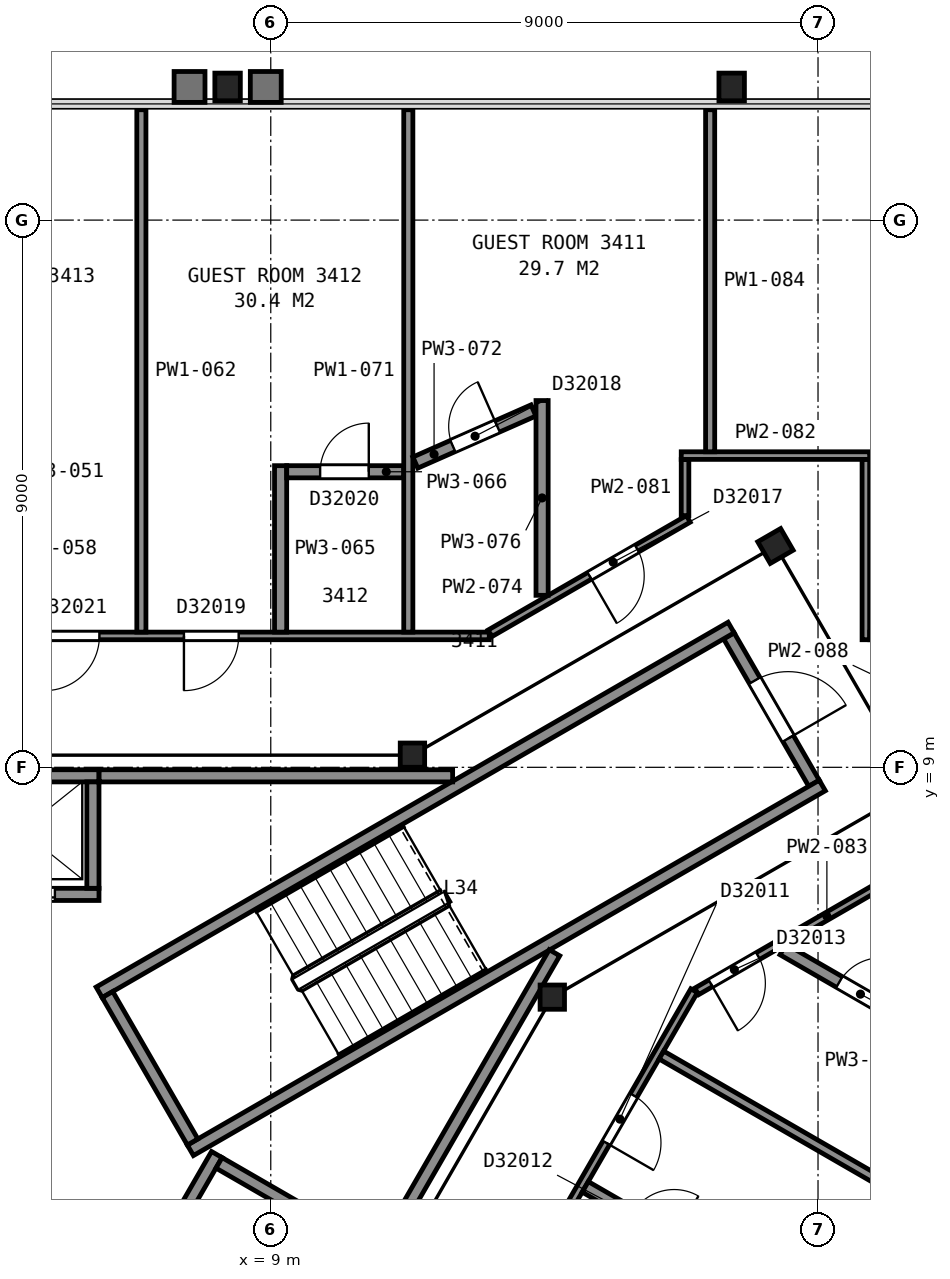
"""IFC4 building model, lengths in metres.
Left out: names, types, materials, properties, quantities, classifications, styles, units other than length and angle.
Written with IfcOpenShell. Run it as: python <this file> out.ifc"""

import sys

from ifc_helpers import new_model, si_unit, direction, frame, frame_2d, origin, origin_2d, place, context, subcontext, project, spatial, rectangle, i_section, extrude, element, fill, save


model = new_model("IFC4")
c1 = context("Model", 3, precision=1e-05, world=origin(), true_north=direction((0.0, 1.0)))
c2 = subcontext(c1, "Body", "Model", "MODEL_VIEW")
j1 = project(units=[si_unit("LENGTHUNIT", "METRE"), si_unit("PLANEANGLEUNIT", "RADIAN")], contexts=[c1])
p1 = place(None, origin())
s1 = spatial("IfcSite", under=j1, at=p1, CompositionType="ELEMENT")
p2 = place(p1, origin())
s2 = spatial("IfcBuilding", under=s1, at=p2, CompositionType="ELEMENT")
p3 = place(p2, frame((0.0, 0.0, 139.6)))
s3 = spatial("IfcBuildingStorey", under=s2, at=p3, CompositionType="ELEMENT", Elevation=139.6)
for number, where, z_axis, x_axis in (
    (1, (16.58, 20.19, 0.0), (0.0, 0.0, 1.0), (1.0, 0.0, 0.0)),
    (2, (8.29, 20.19, 0.0), (0.0, 0.0, 1.0), (1.0, 0.0, 0.0)),
):
    element("IfcColumn", number, at=place(p3, frame(where, z_axis=z_axis, x_axis=x_axis)), inside=s3, PredefinedType="COLUMN", context=c2, shape_type="SweptSolid", body=[
        extrude(i_section(OverallWidth=0.419, OverallDepth=0.455, WebThickness=0.042, FlangeThickness=0.068, FilletRadius=0.015, at=origin_2d()), origin(), (0.0, 0.0, 1.0), 2.87),
    ])
p4 = place(p3, frame((13.63, 5.22, 0.0), z_axis=(0.0, 0.0, 1.0), x_axis=(1.0, 0.0, 0.0)))
e3 = element("IfcColumn", 3, at=p4, inside=s3, PredefinedType="COLUMN", context=c2, shape_type="SweptSolid", body=[
    extrude(i_section(OverallWidth=0.401, OverallDepth=0.399, WebThickness=0.025, FlangeThickness=0.04, FilletRadius=0.015, at=origin_2d()), origin(), (0.0, 0.0, 1.0), 3.535),
])
p5 = place(p3, frame((17.3, 12.64, 0.0), z_axis=(0.0, 0.0, 1.0), x_axis=(0.5, -0.866025403784, 0.0)))
e4 = element("IfcColumn", 4, at=p5, inside=s3, PredefinedType="COLUMN", context=c2, shape_type="SweptSolid", body=[
    extrude(i_section(OverallWidth=0.411, OverallDepth=0.434, WebThickness=0.036, FlangeThickness=0.057, FilletRadius=0.015, at=origin_2d()), origin(), (0.0, 0.0, 1.0), 3.545),
])
p6 = place(p3, frame((11.33, 9.2, 0.0), z_axis=(0.0, 0.0, 1.0), x_axis=(1.0, 0.0, 0.0)))
e5 = element("IfcColumn", 5, at=p6, inside=s3, PredefinedType="COLUMN", context=c2, shape_type="SweptSolid", body=[
    extrude(i_section(OverallWidth=0.401, OverallDepth=0.399, WebThickness=0.025, FlangeThickness=0.04, FilletRadius=0.015, at=origin_2d()), origin(), (0.0, 0.0, 1.0), 3.535),
])
p7 = place(p3, frame((17.934, 8.738, 0.0), z_axis=(0.0, 0.0, 1.0), x_axis=(-0.49998411664, 0.866034573852, 0.0)))
e6 = element("IfcWall", 6, at=p7, inside=s3, PredefinedType="PARTITIONING", context=c2, shape_type="SweptSolid", body=[
    extrude(rectangle(XDim=2.8, YDim=0.2, at=frame_2d((1.4, 0.0))), origin(), (0.0, 0.0, 1.0), 3.35),
])
p8 = place(p7, frame((0.85, 0.0, 0.0)))
e7 = element("IfcOpeningElement", 7, at=p8, cuts=e6, PredefinedType="OPENING", context=c2, shape_type="SweptSolid", body=[
    extrude(rectangle(XDim=1.1, YDim=2.1, at=frame_2d((0.55, 1.05))), frame((0.0, 0.11, 0.0), z_axis=(0.0, -1.0, 0.0), x_axis=(1.0, 0.0, 0.0)), (0.0, 0.0, 1.0), 0.22),
])
for number, where, z_axis, x_axis in (
    (8, (6.178, 5.299, 0.0), (0.0, 0.0, 1.0), (0.866, 0.5, 0.0)),
    (9, (7.678, 2.701, 0.0), (0.0, 0.0, 1.0), (0.866, 0.5, 0.0)),
):
    element("IfcWall", number, at=place(p3, frame(where, z_axis=z_axis, x_axis=x_axis)), inside=s3, PredefinedType="PARTITIONING", context=c2, shape_type="SweptSolid", body=[
        extrude(rectangle(XDim=12.0, YDim=0.2, at=frame_2d((6.0, 0.0))), origin(), (0.0, 0.0, 1.0), 3.35),
    ])
p9 = place(p3, frame((7.715, 2.838, 0.0), z_axis=(0.0, 0.0, 1.0), x_axis=(-0.500049511043, 0.865996816683, 0.0)))
e10 = element("IfcWall", 10, at=p9, inside=s3, PredefinedType="PARTITIONING", context=c2, shape_type="SweptSolid", body=[
    extrude(rectangle(XDim=2.8, YDim=0.2, at=frame_2d((1.4, 0.0))), origin(), (0.0, 0.0, 1.0), 3.35),
])
p10 = place(p3, frame((3.625, 6.91, 0.0), z_axis=(0.0, 0.0, 1.0), x_axis=(1.0, 0.0, 0.0)))
e11 = element("IfcWall", 11, at=p10, inside=s3, PredefinedType="PARTITIONING", context=c2, shape_type="SweptSolid", body=[
    extrude(rectangle(XDim=2.55, YDim=0.2, at=frame_2d((1.275, 0.0))), origin(), (0.0, 0.0, 1.0), 3.6),
])
p11 = place(p10, frame((0.725, 0.0, 0.0)))
e12 = element("IfcOpeningElement", 12, at=p11, cuts=e11, PredefinedType="OPENING", context=c2, shape_type="SweptSolid", body=[
    extrude(rectangle(XDim=1.1, YDim=2.1, at=frame_2d((0.55, 1.05))), frame((0.0, 0.11, 0.0), z_axis=(0.0, -1.0, 0.0), x_axis=(1.0, 0.0, 0.0)), (0.0, 0.0, 1.0), 0.22),
])
p12 = place(p3, frame((3.625, 8.86, 0.0), z_axis=(0.0, 0.0, 1.0), x_axis=(1.0, 0.0, 0.0)))
e13 = element("IfcWall", 13, at=p12, inside=s3, PredefinedType="PARTITIONING", context=c2, shape_type="SweptSolid", body=[
    extrude(rectangle(XDim=2.55, YDim=0.2, at=frame_2d((1.275, 0.0))), origin(), (0.0, 0.0, 1.0), 3.6),
])
p13 = place(p3, frame((5.663, -1.612, 0.0), z_axis=(0.0, 0.0, 1.0), x_axis=(0.49998122708, 0.866036242063, 0.0)))
e14 = element("IfcWall", 14, at=p13, inside=s3, PredefinedType="PARTITIONING", context=c2, shape_type="SweptSolid", body=[
    extrude(rectangle(XDim=4.9, YDim=0.2, at=frame_2d((2.45, 0.0))), origin(), (0.0, 0.0, 1.0), 3.6),
])
p14 = place(p3, frame((6.075, 7.01, 0.0), z_axis=(0.0, 0.0, 1.0), x_axis=(0.0, 1.0, 0.0)))
e15 = element("IfcWall", 15, at=p14, inside=s3, PredefinedType="PARTITIONING", context=c2, shape_type="SweptSolid", body=[
    extrude(rectangle(XDim=1.75, YDim=0.2, at=frame_2d((0.875, 0.0))), origin(), (0.0, 0.0, 1.0), 3.6),
])
p15 = place(p3, frame((9.665, 1.62, 0.0), z_axis=(0.0, 0.0, 1.0), x_axis=(-0.866002029911, 0.500040482552, 0.0)))
e16 = element("IfcWall", 16, at=p15, inside=s3, PredefinedType="PARTITIONING", context=c2, shape_type="SweptSolid", body=[
    extrude(rectangle(XDim=1.75, YDim=0.2, at=frame_2d((0.875, 0.0))), origin(), (0.0, 0.0, 1.0), 3.6),
])
p16 = place(p3, frame((6.177, 8.86, 0.0), z_axis=(0.0, 0.0, 1.0), x_axis=(1.0, 0.0, 0.0)))
e17 = element("IfcWall", 17, at=p16, inside=s3, PredefinedType="PARTITIONING", context=c2, shape_type="SweptSolid", body=[
    extrude(rectangle(XDim=5.814, YDim=0.2, at=frame_2d((2.907, 0.0))), origin(), (0.0, 0.0, 1.0), 3.35),
])
p17 = place(p3, frame((8.492, -3.012, 0.0), z_axis=(0.0, 0.0, 1.0), x_axis=(0.499972957231, 0.866041016371, 0.0)))
e18 = element("IfcWall", 18, at=p17, inside=s3, PredefinedType="PARTITIONING", context=c2, shape_type="SweptSolid", body=[
    extrude(rectangle(XDim=10.349, YDim=0.2, at=frame_2d((5.174, 0.0))), origin(), (0.0, 0.0, 1.0), 3.35),
])
p18 = place(p3, frame((-12.594, 11.161, 0.0), z_axis=(0.0, 0.0, 1.0), x_axis=(1.0, 0.0, 0.0)))
e19 = element("IfcWall", 19, at=p18, inside=s3, PredefinedType="PARTITIONING", context=c2, shape_type="SweptSolid", body=[
    extrude(rectangle(XDim=25.187, YDim=0.125, at=frame_2d((12.594, 0.0))), origin(), (0.0, 0.0, 1.0), 2.262),
])
p19 = place(p18, frame((20.166, 0.0, 0.0)))
e20 = element("IfcOpeningElement", 20, at=p19, cuts=e19, PredefinedType="OPENING", context=c2, shape_type="SweptSolid", body=[
    extrude(rectangle(XDim=0.9, YDim=2.1, at=frame_2d((0.45, 1.05))), frame((0.0, 0.073, 0.0), z_axis=(0.0, -1.0, 0.0), x_axis=(1.0, 0.0, 0.0)), (0.0, 0.0, 1.0), 0.145),
])
p20 = place(p18, frame((17.875, 0.0, 0.0)))
e21 = element("IfcOpeningElement", 21, at=p20, cuts=e19, PredefinedType="OPENING", context=c2, shape_type="SweptSolid", body=[
    extrude(rectangle(XDim=0.9, YDim=2.1, at=frame_2d((0.45, 1.05))), frame((0.0, 0.073, 0.0), z_axis=(0.0, -1.0, 0.0), x_axis=(1.0, 0.0, 0.0)), (0.0, 0.0, 1.0), 0.145),
])
p21 = place(p18, frame((11.062, 0.0, 0.0)))
e22 = element("IfcOpeningElement", 22, at=p21, cuts=e19, PredefinedType="OPENING", context=c2, shape_type="SweptSolid", body=[
    extrude(rectangle(XDim=0.9, YDim=2.1, at=frame_2d((0.45, 1.05))), frame((0.0, 0.073, 0.0), z_axis=(0.0, -1.0, 0.0), x_axis=(1.0, 0.0, 0.0)), (0.0, 0.0, 1.0), 0.145),
])
p22 = place(p18, frame((8.521, 0.0, 0.0)))
e23 = element("IfcOpeningElement", 23, at=p22, cuts=e19, PredefinedType="OPENING", context=c2, shape_type="SweptSolid", body=[
    extrude(rectangle(XDim=0.9, YDim=2.1, at=frame_2d((0.45, 1.05))), frame((0.0, 0.073, 0.0), z_axis=(0.0, -1.0, 0.0), x_axis=(1.0, 0.0, 0.0)), (0.0, 0.0, 1.0), 0.145),
])
p23 = place(p18, frame((2.031, 0.0, 0.0)))
e24 = element("IfcOpeningElement", 24, at=p23, cuts=e19, PredefinedType="OPENING", context=c2, shape_type="SweptSolid", body=[
    extrude(rectangle(XDim=0.9, YDim=2.1, at=frame_2d((0.45, 1.05))), frame((0.0, 0.073, 0.0), z_axis=(0.0, -1.0, 0.0), x_axis=(1.0, 0.0, 0.0)), (0.0, 0.0, 1.0), 0.145),
])
p24 = place(p3, frame((15.962, 5.326, 0.0), z_axis=(0.0, 0.0, 1.0), x_axis=(-0.499992829944, -0.866029543379, 0.0)))
e25 = element("IfcWall", 25, at=p24, inside=s3, PredefinedType="PARTITIONING", context=c2, shape_type="SweptSolid", body=[
    extrude(rectangle(XDim=24.413, YDim=0.125, at=frame_2d((12.207, 0.0))), origin(), (0.0, 0.0, 1.0), 2.262),
])
p25 = place(p24, frame((21.258, 0.0, 0.0)))
e26 = element("IfcOpeningElement", 26, at=p25, cuts=e25, PredefinedType="OPENING", context=c2, shape_type="SweptSolid", body=[
    extrude(rectangle(XDim=0.9, YDim=2.1, at=frame_2d((0.45, 1.05))), frame((0.0, 0.073, 0.0), z_axis=(0.0, -1.0, 0.0), x_axis=(1.0, 0.0, 0.0)), (0.0, 0.0, 1.0), 0.145),
])
p26 = place(p24, frame((18.502, 0.0, 0.0)))
e27 = element("IfcOpeningElement", 27, at=p26, cuts=e25, PredefinedType="OPENING", context=c2, shape_type="SweptSolid", body=[
    extrude(rectangle(XDim=0.9, YDim=2.1, at=frame_2d((0.45, 1.05))), frame((0.0, 0.073, 0.0), z_axis=(0.0, -1.0, 0.0), x_axis=(1.0, 0.0, 0.0)), (0.0, 0.0, 1.0), 0.145),
])
p27 = place(p24, frame((11.799, 0.0, 0.0)))
e28 = element("IfcOpeningElement", 28, at=p27, cuts=e25, PredefinedType="OPENING", context=c2, shape_type="SweptSolid", body=[
    extrude(rectangle(XDim=0.9, YDim=2.1, at=frame_2d((0.45, 1.05))), frame((0.0, 0.073, 0.0), z_axis=(0.0, -1.0, 0.0), x_axis=(1.0, 0.0, 0.0)), (0.0, 0.0, 1.0), 0.145),
])
p28 = place(p24, frame((9.043, 0.0, 0.0)))
e29 = element("IfcOpeningElement", 29, at=p28, cuts=e25, PredefinedType="OPENING", context=c2, shape_type="SweptSolid", body=[
    extrude(rectangle(XDim=0.9, YDim=2.1, at=frame_2d((0.45, 1.05))), frame((0.0, 0.073, 0.0), z_axis=(0.0, -1.0, 0.0), x_axis=(1.0, 0.0, 0.0)), (0.0, 0.0, 1.0), 0.145),
])
p29 = place(p24, frame((1.99, 0.0, 0.0)))
e30 = element("IfcOpeningElement", 30, at=p29, cuts=e25, PredefinedType="OPENING", context=c2, shape_type="SweptSolid", body=[
    extrude(rectangle(XDim=0.9, YDim=2.1, at=frame_2d((0.45, 1.05))), frame((0.0, 0.073, 0.0), z_axis=(0.0, -1.0, 0.0), x_axis=(1.0, 0.0, 0.0)), (0.0, 0.0, 1.0), 0.145),
])
p30 = place(p3, frame((6.872, 11.223, 0.0), z_axis=(0.0, 0.0, 1.0), x_axis=(0.0, 1.0, 0.0)))
e31 = element("IfcWall", 31, at=p30, inside=s3, PredefinedType="PARTITIONING", context=c2, shape_type="SweptSolid", body=[
    extrude(rectangle(XDim=8.592, YDim=0.15, at=frame_2d((4.296, 0.0))), origin(), (0.0, 0.0, 1.0), 2.262),
])
p31 = place(p3, frame((9.162, 11.223, 0.0), z_axis=(0.0, 0.0, 1.0), x_axis=(0.0, 1.0, 0.0)))
e32 = element("IfcWall", 32, at=p31, inside=s3, PredefinedType="PARTITIONING", context=c2, shape_type="SweptSolid", body=[
    extrude(rectangle(XDim=2.738, YDim=0.2, at=frame_2d((1.369, 0.0))), origin(), (0.0, 0.0, 1.0), 2.262),
])
p32 = place(p3, frame((11.187, 13.861, 0.0), z_axis=(0.0, 0.0, 1.0), x_axis=(-1.0, 0.0, 0.0)))
e33 = element("IfcWall", 33, at=p32, inside=s3, PredefinedType="PARTITIONING", context=c2, shape_type="SweptSolid", body=[
    extrude(rectangle(XDim=1.925, YDim=0.2, at=frame_2d((0.962, 0.0))), origin(), (0.0, 0.0, 1.0), 2.262),
])
p33 = place(p32, frame((0.575, 0.0, 0.0)))
e34 = element("IfcOpeningElement", 34, at=p33, cuts=e33, PredefinedType="OPENING", context=c2, shape_type="SweptSolid", body=[
    extrude(rectangle(XDim=0.8, YDim=2.1, at=frame_2d((0.4, 1.05))), frame((0.0, 0.11, 0.0), z_axis=(0.0, -1.0, 0.0), x_axis=(1.0, 0.0, 0.0)), (0.0, 0.0, 1.0), 0.22),
])
p34 = place(p3, frame((11.262, 11.223, 0.0), z_axis=(0.0, 0.0, 1.0), x_axis=(0.0, 1.0, 0.0)))
e35 = element("IfcWall", 35, at=p34, inside=s3, PredefinedType="PARTITIONING", context=c2, shape_type="SweptSolid", body=[
    extrude(rectangle(XDim=8.592, YDim=0.15, at=frame_2d((4.296, 0.0))), origin(), (0.0, 0.0, 1.0), 2.262),
])
p35 = place(p3, frame((13.32, 14.869, 0.0), z_axis=(0.0, 0.0, 1.0), x_axis=(-0.914870345188, -0.403747757263, 0.0)))
e36 = element("IfcWall", 36, at=p35, inside=s3, PredefinedType="PARTITIONING", context=c2, shape_type="SweptSolid", body=[
    extrude(rectangle(XDim=2.124, YDim=0.2, at=frame_2d((1.062, 0.0))), origin(), (0.0, 0.0, 1.0), 2.262),
])
p36 = place(p35, frame((0.65, 0.0, 0.0)))
e37 = element("IfcOpeningElement", 37, at=p36, cuts=e36, PredefinedType="OPENING", context=c2, shape_type="SweptSolid", body=[
    extrude(rectangle(XDim=0.8, YDim=2.1, at=frame_2d((0.4, 1.05))), frame((0.0, 0.11, 0.0), z_axis=(0.0, -1.0, 0.0), x_axis=(1.0, 0.0, 0.0)), (0.0, 0.0, 1.0), 0.22),
])
p37 = place(p3, frame((12.605, 11.203, 0.0), z_axis=(0.0, 0.0, 1.0), x_axis=(0.866113281362, 0.499847760672, 0.0)))
e38 = element("IfcWall", 38, at=p37, inside=s3, PredefinedType="PARTITIONING", context=c2, shape_type="SweptSolid", body=[
    extrude(rectangle(XDim=3.767, YDim=0.125, at=frame_2d((1.883, 0.0))), origin(), (0.0, 0.0, 1.0), 2.262),
])
p38 = place(p37, frame((1.89, 0.0, 0.0)))
e39 = element("IfcOpeningElement", 39, at=p38, cuts=e38, PredefinedType="OPENING", context=c2, shape_type="SweptSolid", body=[
    extrude(rectangle(XDim=0.9, YDim=2.1, at=frame_2d((0.45, 1.05))), frame((0.0, 0.073, 0.0), z_axis=(0.0, -1.0, 0.0), x_axis=(1.0, 0.0, 0.0)), (0.0, 0.0, 1.0), 0.145),
])
p39 = place(p3, frame((13.462, 11.829, 0.0), z_axis=(0.0, 0.0, 1.0), x_axis=(0.0, 1.0, 0.0)))
e40 = element("IfcWall", 40, at=p39, inside=s3, PredefinedType="PARTITIONING", context=c2, shape_type="SweptSolid", body=[
    extrude(rectangle(XDim=3.203, YDim=0.2, at=frame_2d((1.602, 0.0))), origin(), (0.0, 0.0, 1.0), 2.262),
])
p40 = place(p3, frame((16.542, 0.731, 0.0), z_axis=(0.0, 0.0, 1.0), x_axis=(-0.86596722502, 0.50010075504, 0.0)))
e41 = element("IfcWall", 41, at=p40, inside=s3, PredefinedType="PARTITIONING", context=c2, shape_type="SweptSolid", body=[
    extrude(rectangle(XDim=2.737, YDim=0.2, at=frame_2d((1.369, 0.0))), origin(), (0.0, 0.0, 1.0), 2.262),
])
p41 = place(p40, frame((1.05, 0.0, 0.0)))
e42 = element("IfcOpeningElement", 42, at=p41, cuts=e41, PredefinedType="OPENING", context=c2, shape_type="SweptSolid", body=[
    extrude(rectangle(XDim=0.8, YDim=2.1, at=frame_2d((0.4, 1.05))), frame((0.0, 0.11, 0.0), z_axis=(0.0, -1.0, 0.0), x_axis=(1.0, 0.0, 0.0)), (0.0, 0.0, 1.0), 0.22),
])
p42 = place(p3, frame((15.424, 4.268, 0.0), z_axis=(0.0, 0.0, 1.0), x_axis=(0.866022320763, -0.500005339912, 0.0)))
e43 = element("IfcWall", 43, at=p42, inside=s3, PredefinedType="PARTITIONING", context=c2, shape_type="SweptSolid", body=[
    extrude(rectangle(XDim=8.591, YDim=0.15, at=frame_2d((4.296, 0.0))), origin(), (0.0, 0.0, 1.0), 2.262),
])
p43 = place(p3, frame((15.813, 13.14, 0.0), z_axis=(0.0, 0.0, 1.0), x_axis=(0.0, 1.0, 0.0)))
e44 = element("IfcWall", 44, at=p43, inside=s3, PredefinedType="PARTITIONING", context=c2, shape_type="SweptSolid", body=[
    extrude(rectangle(XDim=0.922, YDim=0.125, at=frame_2d((0.461, 0.0))), origin(), (0.0, 0.0, 1.0), 2.262),
])
p44 = place(p3, frame((15.75, 14.127, 0.0), z_axis=(0.0, 0.0, 1.0), x_axis=(1.0, 0.0, 0.0)))
e45 = element("IfcWall", 45, at=p44, inside=s3, PredefinedType="PARTITIONING", context=c2, shape_type="SweptSolid", body=[
    extrude(rectangle(XDim=3.099, YDim=0.125, at=frame_2d((1.55, 0.0))), origin(), (0.0, 0.0, 1.0), 2.262),
])
p45 = place(p3, frame((19.278, 7.204, 0.0), z_axis=(0.0, 0.0, 1.0), x_axis=(-0.866028547684, -0.499994554566, 0.0)))
e46 = element("IfcWall", 46, at=p45, inside=s3, PredefinedType="PARTITIONING", context=c2, shape_type="SweptSolid", body=[
    extrude(rectangle(XDim=3.78, YDim=0.125, at=frame_2d((1.89, 0.0))), origin(), (0.0, 0.0, 1.0), 2.262),
])
p46 = place(p45, frame((2.615, 0.0, 0.0)))
e47 = element("IfcOpeningElement", 47, at=p46, cuts=e46, PredefinedType="OPENING", context=c2, shape_type="SweptSolid", body=[
    extrude(rectangle(XDim=0.9, YDim=2.1, at=frame_2d((0.45, 1.05))), frame((0.0, 0.073, 0.0), z_axis=(0.0, -1.0, 0.0), x_axis=(1.0, 0.0, 0.0)), (0.0, 0.0, 1.0), 0.145),
])
p47 = place(p3, frame((16.226, 14.189, 0.0), z_axis=(0.0, 0.0, 1.0), x_axis=(0.0, 1.0, 0.0)))
e48 = element("IfcWall", 48, at=p47, inside=s3, PredefinedType="PARTITIONING", context=c2, shape_type="SweptSolid", body=[
    extrude(rectangle(XDim=5.625, YDim=0.15, at=frame_2d((2.813, 0.0))), origin(), (0.0, 0.0, 1.0), 2.262),
])
p48 = place(p3, frame((17.425, 6.004, 0.0), z_axis=(0.0, 0.0, 1.0), x_axis=(0.866145753309, -0.499791490549, 0.0)))
e49 = element("IfcWall", 49, at=p48, inside=s3, PredefinedType="PARTITIONING", context=c2, shape_type="SweptSolid", body=[
    extrude(rectangle(XDim=3.163, YDim=0.2, at=frame_2d((1.582, 0.0))), origin(), (0.0, 0.0, 1.0), 2.262),
])
p49 = place(p48, frame((1.07, 0.0, 0.0)))
e50 = element("IfcOpeningElement", 50, at=p49, cuts=e49, PredefinedType="OPENING", context=c2, shape_type="SweptSolid", body=[
    extrude(rectangle(XDim=0.8, YDim=2.1, at=frame_2d((0.4, 1.05))), frame((0.0, 0.11, 0.0), z_axis=(0.0, -1.0, 0.0), x_axis=(1.0, 0.0, 0.0)), (0.0, 0.0, 1.0), 0.22),
])
p50 = place(p3, frame((18.787, 11.098, 0.0), z_axis=(0.0, 0.0, 1.0), x_axis=(0.0, 1.0, 0.0)))
e51 = element("IfcWall", 51, at=p50, inside=s3, PredefinedType="PARTITIONING", context=c2, shape_type="SweptSolid", body=[
    extrude(rectangle(XDim=2.964, YDim=0.125, at=frame_2d((1.482, 0.0))), origin(), (0.0, 0.0, 1.0), 2.262),
])
p51 = place(p8, origin())
e52 = element("IfcDoor", 52, at=p51, inside=s3, OperationType="SINGLE_SWING_LEFT", PredefinedType="DOOR", context=c2, shape_type="SweptSolid", body=[
    extrude(rectangle(XDim=1.1, YDim=2.1, at=frame_2d((0.55, 1.05))), frame((0.0, 0.025, 0.0), z_axis=(0.0, -1.0, 0.0), x_axis=(1.0, 0.0, 0.0)), (0.0, 0.0, 1.0), 0.05),
])
fill(e7, e52)
p52 = place(p11, origin())
e53 = element("IfcDoor", 53, at=p52, inside=s3, OperationType="SLIDING_TO_LEFT", PredefinedType="DOOR", context=c2, shape_type="SweptSolid", body=[
    extrude(rectangle(XDim=1.1, YDim=2.1, at=frame_2d((0.55, 1.05))), frame((0.0, 0.025, 0.0), z_axis=(0.0, -1.0, 0.0), x_axis=(1.0, 0.0, 0.0)), (0.0, 0.0, 1.0), 0.05),
])
fill(e12, e53)
p53 = place(p19, origin())
e54 = element("IfcDoor", 54, at=p53, inside=s3, OperationType="SINGLE_SWING_LEFT", PredefinedType="DOOR", context=c2, shape_type="SweptSolid", body=[
    extrude(rectangle(XDim=0.9, YDim=2.1, at=frame_2d((0.45, 1.05))), frame((0.0, 0.025, 0.0), z_axis=(0.0, -1.0, 0.0), x_axis=(1.0, 0.0, 0.0)), (0.0, 0.0, 1.0), 0.05),
])
fill(e20, e54)
p54 = place(p20, origin())
e55 = element("IfcDoor", 55, at=p54, inside=s3, OperationType="SINGLE_SWING_LEFT", PredefinedType="DOOR", context=c2, shape_type="SweptSolid", body=[
    extrude(rectangle(XDim=0.9, YDim=2.1, at=frame_2d((0.45, 1.05))), frame((0.0, 0.025, 0.0), z_axis=(0.0, -1.0, 0.0), x_axis=(1.0, 0.0, 0.0)), (0.0, 0.0, 1.0), 0.05),
])
fill(e21, e55)
p55 = place(p29, origin())
e56 = element("IfcDoor", 56, at=p55, inside=s3, OperationType="SINGLE_SWING_RIGHT", PredefinedType="DOOR", context=c2, shape_type="SweptSolid", body=[
    extrude(rectangle(XDim=0.9, YDim=2.1, at=frame_2d((0.45, 1.05))), frame((0.0, 0.025, 0.0), z_axis=(0.0, -1.0, 0.0), x_axis=(1.0, 0.0, 0.0)), (0.0, 0.0, 1.0), 0.05),
])
fill(e30, e56)
p56 = place(p33, origin())
e57 = element("IfcDoor", 57, at=p56, inside=s3, OperationType="SINGLE_SWING_LEFT", PredefinedType="DOOR", context=c2, shape_type="SweptSolid", body=[
    extrude(rectangle(XDim=0.8, YDim=2.1, at=frame_2d((0.4, 1.05))), frame((0.0, 0.025, 0.0), z_axis=(0.0, -1.0, 0.0), x_axis=(1.0, 0.0, 0.0)), (0.0, 0.0, 1.0), 0.05),
])
fill(e34, e57)
p57 = place(p36, origin())
e58 = element("IfcDoor", 58, at=p57, inside=s3, OperationType="SINGLE_SWING_LEFT", PredefinedType="DOOR", context=c2, shape_type="SweptSolid", body=[
    extrude(rectangle(XDim=0.8, YDim=2.1, at=frame_2d((0.4, 1.05))), frame((0.0, 0.025, 0.0), z_axis=(0.0, -1.0, 0.0), x_axis=(1.0, 0.0, 0.0)), (0.0, 0.0, 1.0), 0.05),
])
fill(e37, e58)
p58 = place(p38, origin())
e59 = element("IfcDoor", 59, at=p58, inside=s3, OperationType="SINGLE_SWING_LEFT", PredefinedType="DOOR", context=c2, shape_type="SweptSolid", body=[
    extrude(rectangle(XDim=0.9, YDim=2.1, at=frame_2d((0.45, 1.05))), frame((0.0, 0.025, 0.0), z_axis=(0.0, -1.0, 0.0), x_axis=(1.0, 0.0, 0.0)), (0.0, 0.0, 1.0), 0.05),
])
fill(e39, e59)
p59 = place(p46, origin())
e60 = element("IfcDoor", 60, at=p59, inside=s3, OperationType="SINGLE_SWING_RIGHT", PredefinedType="DOOR", context=c2, shape_type="SweptSolid", body=[
    extrude(rectangle(XDim=0.9, YDim=2.1, at=frame_2d((0.45, 1.05))), frame((0.0, 0.025, 0.0), z_axis=(0.0, -1.0, 0.0), x_axis=(1.0, 0.0, 0.0)), (0.0, 0.0, 1.0), 0.05),
])
fill(e47, e60)
p60 = place(p49, origin())
e61 = element("IfcDoor", 61, at=p60, inside=s3, OperationType="SINGLE_SWING_RIGHT", PredefinedType="DOOR", context=c2, shape_type="SweptSolid", body=[
    extrude(rectangle(XDim=0.8, YDim=2.1, at=frame_2d((0.4, 1.05))), frame((0.0, 0.025, 0.0), z_axis=(0.0, -1.0, 0.0), x_axis=(1.0, 0.0, 0.0)), (0.0, 0.0, 1.0), 0.05),
])
fill(e50, e61)
save(model, sys.argv[1])
